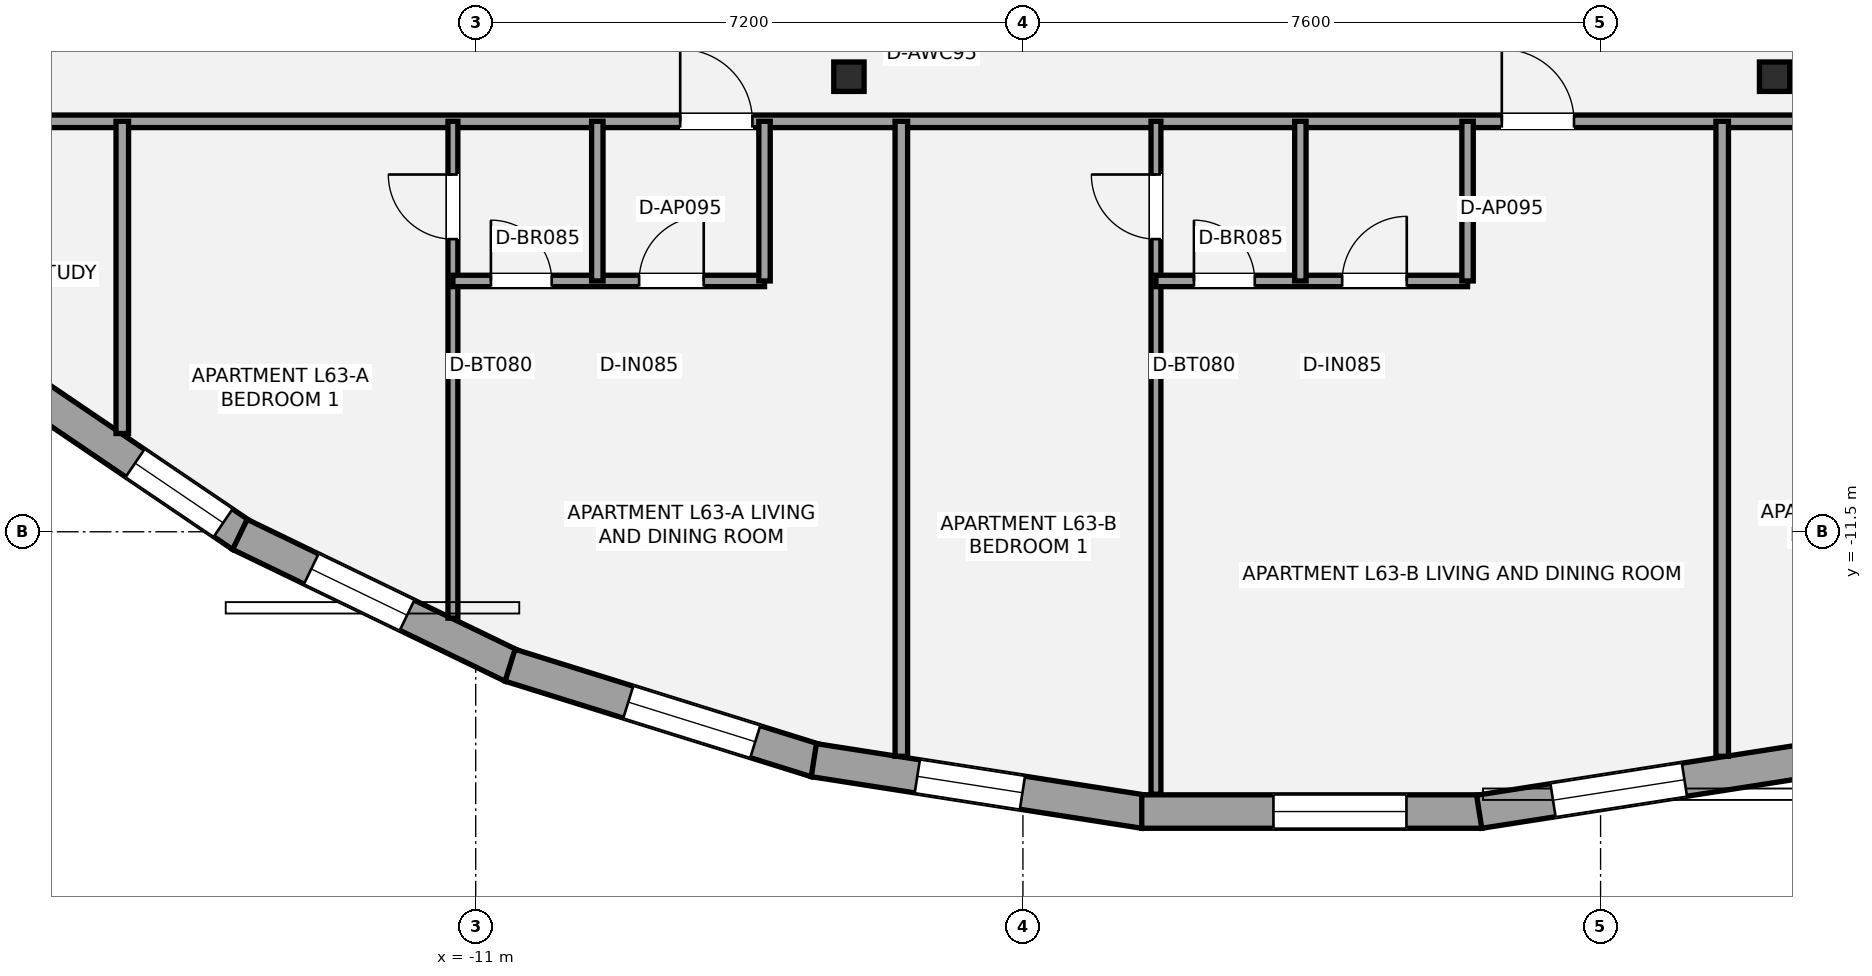
"""IFC4 building model, lengths in metres.
Left out: names, types, materials, properties, quantities, classifications, styles, units other than length and angle.
Written with IfcOpenShell. Run it as: python <this file> out.ifc"""

import sys

from ifc_helpers import new_model, si_unit, direction, frame, frame_2d, origin, origin_2d, place, context, subcontext, project, spatial, rectangle, i_section, extrude, element, fill, save


model = new_model("IFC4")
c1 = context("Model", 3, precision=1e-05, world=origin(), true_north=direction((0.0, 1.0)))
c2 = subcontext(c1, "Body", "Model", "MODEL_VIEW")
j1 = project(units=[si_unit("LENGTHUNIT", "METRE"), si_unit("PLANEANGLEUNIT", "RADIAN")], contexts=[c1])
p1 = place(None, origin())
s1 = spatial("IfcSite", under=j1, at=p1, CompositionType="ELEMENT")
p2 = place(p1, origin())
s2 = spatial("IfcBuilding", under=s1, at=p2, CompositionType="ELEMENT")
p3 = place(p2, frame((0.0, 0.0, 225.75)))
s3 = spatial("IfcBuildingStorey", under=s2, at=p3, CompositionType="ELEMENT", Elevation=225.75)
for number, where, z_axis, x_axis in (
    (1, (-6.09, -5.513, 0.0), (0.0, 0.0, 1.0), (1.0, 0.0, 0.0)),
    (2, (6.09, -5.513, 0.0), (0.0, 0.0, 1.0), (1.0, 0.0, 0.0)),
):
    element("IfcColumn", number, at=place(p3, frame(where, z_axis=z_axis, x_axis=x_axis)), inside=s3, PredefinedType="COLUMN", context=c2, shape_type="SweptSolid", body=[
        extrude(i_section(OverallWidth=0.399, OverallDepth=0.387, WebThickness=0.021, FlangeThickness=0.033, at=origin_2d()), origin(), (0.0, 0.0, 1.0), 3.15),
    ])
p4 = place(p3, frame((-14.075, -11.551, 0.0), z_axis=(0.0, 0.0, 1.0), x_axis=(-0.827635686249, 0.561265686504, 0.0)))
e3 = element("IfcWall", 3, at=p4, inside=s3, PredefinedType="STANDARD", context=c2, shape_type="SweptSolid", body=[
    extrude(rectangle(XDim=3.749, YDim=0.44, at=frame_2d((1.875, 0.0))), origin(), (0.0, 0.0, 1.0), 2.336),
])
p5 = place(p4, frame((0.3, 0.0, 0.58)))
e4 = element("IfcOpeningElement", 4, at=p5, cuts=e3, PredefinedType="OPENING", context=c2, shape_type="SweptSolid", body=[
    extrude(rectangle(XDim=1.4, YDim=1.55, at=frame_2d((0.7, 0.775))), frame((0.0, 0.23, 0.0), z_axis=(0.0, -1.0, 0.0), x_axis=(1.0, 0.0, 0.0)), (0.0, 0.0, 1.0), 0.46),
])
p6 = place(p3, frame((-10.518, -13.268, 0.0), z_axis=(0.0, 0.0, 1.0), x_axis=(-0.900331335269, 0.435205108808, 0.0)))
e5 = element("IfcWall", 5, at=p6, inside=s3, PredefinedType="STANDARD", context=c2, shape_type="SweptSolid", body=[
    extrude(rectangle(XDim=3.982, YDim=0.44, at=frame_2d((1.991, 0.0))), origin(), (0.0, 0.0, 1.0), 2.336),
])
p7 = place(p6, frame((1.539, 0.0, 0.55)))
e6 = element("IfcOpeningElement", 6, at=p7, cuts=e5, PredefinedType="OPENING", context=c2, shape_type="SweptSolid", body=[
    extrude(rectangle(XDim=1.4, YDim=1.55, at=frame_2d((0.7, 0.775))), frame((0.0, 0.23, 0.0), z_axis=(0.0, -1.0, 0.0), x_axis=(1.0, 0.0, 0.0)), (0.0, 0.0, 1.0), 0.46),
])
p8 = place(p3, frame((-6.52, -14.512, 0.0), z_axis=(0.0, 0.0, 1.0), x_axis=(-0.954643532685, 0.297751113352, 0.0)))
e7 = element("IfcWall", 7, at=p8, inside=s3, PredefinedType="STANDARD", context=c2, shape_type="SweptSolid", body=[
    extrude(rectangle(XDim=4.219, YDim=0.44, at=frame_2d((2.11, 0.0))), origin(), (0.0, 0.0, 1.0), 2.336),
])
p9 = place(p8, frame((0.841, 0.0, 0.55)))
e8 = element("IfcOpeningElement", 8, at=p9, cuts=e7, PredefinedType="OPENING", context=c2, shape_type="SweptSolid", body=[
    extrude(rectangle(XDim=1.75, YDim=1.55, at=frame_2d((0.875, 0.775))), frame((0.0, 0.23, 0.0), z_axis=(0.0, -1.0, 0.0), x_axis=(1.0, 0.0, 0.0)), (0.0, 0.0, 1.0), 0.46),
])
p10 = place(p3, frame((-2.203, -15.183, 0.0), z_axis=(0.0, 0.0, 1.0), x_axis=(-0.988037139715, 0.154216116355, 0.0)))
e9 = element("IfcWall", 9, at=p10, inside=s3, PredefinedType="STANDARD", context=c2, shape_type="SweptSolid", body=[
    extrude(rectangle(XDim=4.401, YDim=0.44, at=frame_2d((2.201, 0.0))), origin(), (0.0, 0.0, 1.0), 2.336),
])
p11 = place(p10, frame((1.623, 0.0, 0.45)))
e10 = element("IfcOpeningElement", 10, at=p11, cuts=e9, PredefinedType="OPENING", context=c2, shape_type="SweptSolid", body=[
    extrude(rectangle(XDim=1.4, YDim=1.55, at=frame_2d((0.7, 0.775))), frame((0.0, 0.23, 0.0), z_axis=(0.0, -1.0, 0.0), x_axis=(1.0, 0.0, 0.0)), (0.0, 0.0, 1.0), 0.46),
])
p12 = place(p3, frame((2.237, -15.181, 0.0), z_axis=(0.0, 0.0, 1.0), x_axis=(-1.0, 0.0, 0.0)))
e11 = element("IfcWall", 11, at=p12, inside=s3, PredefinedType="STANDARD", context=c2, shape_type="SweptSolid", body=[
    extrude(rectangle(XDim=4.474, YDim=0.44, at=frame_2d((2.237, 0.0))), origin(), (0.0, 0.0, 1.0), 2.336),
])
p13 = place(p12, frame((0.991, 0.0, 0.55)))
e12 = element("IfcOpeningElement", 12, at=p13, cuts=e11, PredefinedType="OPENING", context=c2, shape_type="SweptSolid", body=[
    extrude(rectangle(XDim=1.75, YDim=1.55, at=frame_2d((0.875, 0.775))), frame((0.0, 0.23, 0.0), z_axis=(0.0, -1.0, 0.0), x_axis=(1.0, 0.0, 0.0)), (0.0, 0.0, 1.0), 0.46),
])
p14 = place(p3, frame((6.551, -14.505, 0.0), z_axis=(0.0, 0.0, 1.0), x_axis=(-0.988037139715, -0.154216116355, 0.0)))
e13 = element("IfcWall", 13, at=p14, inside=s3, PredefinedType="STANDARD", context=c2, shape_type="SweptSolid", body=[
    extrude(rectangle(XDim=4.401, YDim=0.44, at=frame_2d((2.201, 0.0))), origin(), (0.0, 0.0, 1.0), 2.336),
])
p15 = place(p14, frame((1.668, 0.0, 0.55)))
e14 = element("IfcOpeningElement", 14, at=p15, cuts=e13, PredefinedType="OPENING", context=c2, shape_type="SweptSolid", body=[
    extrude(rectangle(XDim=1.75, YDim=1.55, at=frame_2d((0.875, 0.775))), frame((0.0, 0.23, 0.0), z_axis=(0.0, -1.0, 0.0), x_axis=(1.0, 0.0, 0.0)), (0.0, 0.0, 1.0), 0.46),
])
p16 = place(p3, frame((-20.059, -6.1, 0.0), z_axis=(0.0, 0.0, 1.0), x_axis=(1.0, 0.0, 0.0)))
e15 = element("IfcWall", 15, at=p16, inside=s3, PredefinedType="PARTITIONING", context=c2, shape_type="SweptSolid", body=[
    extrude(rectangle(XDim=40.118, YDim=0.165, at=frame_2d((20.059, 0.0))), origin(), (0.0, 0.0, 1.0), 2.423),
])
p17 = place(p16, frame((1.252, 0.0, 0.0)))
e16 = element("IfcOpeningElement", 16, at=p17, cuts=e15, PredefinedType="OPENING", context=c2, shape_type="SweptSolid", body=[
    extrude(rectangle(XDim=1.0, YDim=2.15, at=frame_2d((0.5, 1.075))), frame((0.0, 0.093, 0.0), z_axis=(0.0, -1.0, 0.0), x_axis=(1.0, 0.0, 0.0)), (0.0, 0.0, 1.0), 0.185),
])
p18 = place(p16, frame((37.817, 0.0, 0.0)))
e17 = element("IfcOpeningElement", 17, at=p18, cuts=e15, PredefinedType="OPENING", context=c2, shape_type="SweptSolid", body=[
    extrude(rectangle(XDim=1.0, YDim=2.15, at=frame_2d((0.5, 1.075))), frame((0.0, 0.093, 0.0), z_axis=(0.0, -1.0, 0.0), x_axis=(1.0, 0.0, 0.0)), (0.0, 0.0, 1.0), 0.185),
])
p19 = place(p16, frame((11.75, 0.0, 0.0)))
e18 = element("IfcOpeningElement", 18, at=p19, cuts=e15, PredefinedType="OPENING", context=c2, shape_type="SweptSolid", body=[
    extrude(rectangle(XDim=0.95, YDim=2.15, at=frame_2d((0.475, 1.075))), frame((0.0, 0.093, 0.0), z_axis=(0.0, -1.0, 0.0), x_axis=(1.0, 0.0, 0.0)), (0.0, 0.0, 1.0), 0.185),
])
p20 = place(p16, frame((22.56, 0.0, 0.0)))
e19 = element("IfcOpeningElement", 19, at=p20, cuts=e15, PredefinedType="OPENING", context=c2, shape_type="SweptSolid", body=[
    extrude(rectangle(XDim=0.95, YDim=2.15, at=frame_2d((0.475, 1.075))), frame((0.0, 0.093, 0.0), z_axis=(0.0, -1.0, 0.0), x_axis=(1.0, 0.0, 0.0)), (0.0, 0.0, 1.0), 0.185),
])
p21 = place(p16, frame((33.36, 0.0, 0.0)))
e20 = element("IfcOpeningElement", 20, at=p21, cuts=e15, PredefinedType="OPENING", context=c2, shape_type="SweptSolid", body=[
    extrude(rectangle(XDim=0.95, YDim=2.15, at=frame_2d((0.475, 1.075))), frame((0.0, 0.093, 0.0), z_axis=(0.0, -1.0, 0.0), x_axis=(1.0, 0.0, 0.0)), (0.0, 0.0, 1.0), 0.185),
])
p22 = place(p3, frame((-15.65, -10.207, 0.0), z_axis=(0.0, 0.0, 1.0), x_axis=(0.0, 1.0, 0.0)))
e21 = element("IfcWall", 21, at=p22, inside=s3, PredefinedType="PARTITIONING", context=c2, shape_type="SweptSolid", body=[
    extrude(rectangle(XDim=4.107, YDim=0.165, at=frame_2d((2.053, 0.0))), origin(), (0.0, 0.0, 1.0), 2.423),
])
for number, where, z_axis, x_axis in (
    (22, (-5.4, -14.454, 0.0), (0.0, 0.0, 1.0), (0.0, 1.0, 0.0)),
    (23, (5.4, -14.454, 0.0), (0.0, 0.0, 1.0), (0.0, 1.0, 0.0)),
):
    element("IfcWall", number, at=place(p3, frame(where, z_axis=z_axis, x_axis=x_axis)), inside=s3, PredefinedType="PARTITIONING", context=c2, shape_type="SweptSolid", body=[
        extrude(rectangle(XDim=8.354, YDim=0.165, at=frame_2d((4.177, 0.0))), origin(), (0.0, 0.0, 1.0), 2.423),
    ])
p23 = place(p3, frame((-11.3, -12.636, 0.0), z_axis=(0.0, 0.0, 1.0), x_axis=(0.0, 1.0, 0.0)))
e24 = element("IfcWall", 24, at=p23, inside=s3, PredefinedType="PARTITIONING", context=c2, shape_type="SweptSolid", body=[
    extrude(rectangle(XDim=6.536, YDim=0.13, at=frame_2d((3.268, 0.0))), origin(), (0.0, 0.0, 1.0), 2.423),
])
p24 = place(p23, frame((4.986, 0.0, 0.0)))
e25 = element("IfcOpeningElement", 25, at=p24, cuts=e24, PredefinedType="OPENING", context=c2, shape_type="SweptSolid", body=[
    extrude(rectangle(XDim=0.85, YDim=2.1, at=frame_2d((0.425, 1.05))), frame((0.0, 0.075, 0.0), z_axis=(0.0, -1.0, 0.0), x_axis=(1.0, 0.0, 0.0)), (0.0, 0.0, 1.0), 0.15),
])
p25 = place(p3, frame((-11.3, -8.2, 0.0), z_axis=(0.0, 0.0, 1.0), x_axis=(1.0, 0.0, 0.0)))
e26 = element("IfcWall", 26, at=p25, inside=s3, PredefinedType="PLUMBINGWALL", context=c2, shape_type="SweptSolid", body=[
    extrude(rectangle(XDim=4.1, YDim=0.15, at=frame_2d((2.05, 0.0))), origin(), (0.0, 0.0, 1.0), 2.423),
])
p26 = place(p25, frame((0.5, 0.0, 0.0)))
e27 = element("IfcOpeningElement", 27, at=p26, cuts=e26, PredefinedType="OPENING", context=c2, shape_type="SweptSolid", body=[
    extrude(rectangle(XDim=0.8, YDim=2.1, at=frame_2d((0.4, 1.05))), frame((0.0, 0.085, 0.0), z_axis=(0.0, -1.0, 0.0), x_axis=(1.0, 0.0, 0.0)), (0.0, 0.0, 1.0), 0.17),
])
p27 = place(p25, frame((2.45, 0.0, 0.0)))
e28 = element("IfcOpeningElement", 28, at=p27, cuts=e26, PredefinedType="OPENING", context=c2, shape_type="SweptSolid", body=[
    extrude(rectangle(XDim=0.85, YDim=2.1, at=frame_2d((0.425, 1.05))), frame((0.0, 0.085, 0.0), z_axis=(0.0, -1.0, 0.0), x_axis=(1.0, 0.0, 0.0)), (0.0, 0.0, 1.0), 0.17),
])
p28 = place(p3, frame((-9.4, -8.2, 0.0), z_axis=(0.0, 0.0, 1.0), x_axis=(0.0, 1.0, 0.0)))
e29 = element("IfcWall", 29, at=p28, inside=s3, PredefinedType="PLUMBINGWALL", context=c2, shape_type="SweptSolid", body=[
    extrude(rectangle(XDim=2.1, YDim=0.15, at=frame_2d((1.05, 0.0))), origin(), (0.0, 0.0, 1.0), 2.97),
])
p29 = place(p3, frame((-7.2, -8.2, 0.0), z_axis=(0.0, 0.0, 1.0), x_axis=(0.0, 1.0, 0.0)))
e30 = element("IfcWall", 30, at=p29, inside=s3, PredefinedType="PLUMBINGWALL", context=c2, shape_type="SweptSolid", body=[
    extrude(rectangle(XDim=2.1, YDim=0.15, at=frame_2d((1.05, 0.0))), origin(), (0.0, 0.0, 1.0), 2.423),
])
p30 = place(p3, frame((-2.05, -14.953, 0.0), z_axis=(0.0, 0.0, 1.0), x_axis=(0.0, 1.0, 0.0)))
e31 = element("IfcWall", 31, at=p30, inside=s3, PredefinedType="PARTITIONING", context=c2, shape_type="SweptSolid", body=[
    extrude(rectangle(XDim=8.853, YDim=0.13, at=frame_2d((4.426, 0.0))), origin(), (0.0, 0.0, 1.0), 2.423),
])
p31 = place(p30, frame((7.303, 0.0, 0.0)))
e32 = element("IfcOpeningElement", 32, at=p31, cuts=e31, PredefinedType="OPENING", context=c2, shape_type="SweptSolid", body=[
    extrude(rectangle(XDim=0.85, YDim=2.1, at=frame_2d((0.425, 1.05))), frame((0.0, 0.075, 0.0), z_axis=(0.0, -1.0, 0.0), x_axis=(1.0, 0.0, 0.0)), (0.0, 0.0, 1.0), 0.15),
])
p32 = place(p3, frame((-2.05, -8.2, 0.0), z_axis=(0.0, 0.0, 1.0), x_axis=(1.0, 0.0, 0.0)))
e33 = element("IfcWall", 33, at=p32, inside=s3, PredefinedType="PLUMBINGWALL", context=c2, shape_type="SweptSolid", body=[
    extrude(rectangle(XDim=4.1, YDim=0.15, at=frame_2d((2.05, 0.0))), origin(), (0.0, 0.0, 1.0), 2.423),
])
p33 = place(p32, frame((0.5, 0.0, 0.0)))
e34 = element("IfcOpeningElement", 34, at=p33, cuts=e33, PredefinedType="OPENING", context=c2, shape_type="SweptSolid", body=[
    extrude(rectangle(XDim=0.8, YDim=2.1, at=frame_2d((0.4, 1.05))), frame((0.0, 0.085, 0.0), z_axis=(0.0, -1.0, 0.0), x_axis=(1.0, 0.0, 0.0)), (0.0, 0.0, 1.0), 0.17),
])
p34 = place(p32, frame((2.45, 0.0, 0.0)))
e35 = element("IfcOpeningElement", 35, at=p34, cuts=e33, PredefinedType="OPENING", context=c2, shape_type="SweptSolid", body=[
    extrude(rectangle(XDim=0.85, YDim=2.1, at=frame_2d((0.425, 1.05))), frame((0.0, 0.085, 0.0), z_axis=(0.0, -1.0, 0.0), x_axis=(1.0, 0.0, 0.0)), (0.0, 0.0, 1.0), 0.17),
])
p35 = place(p3, frame((-0.15, -8.2, 0.0), z_axis=(0.0, 0.0, 1.0), x_axis=(0.0, 1.0, 0.0)))
e36 = element("IfcWall", 36, at=p35, inside=s3, PredefinedType="PLUMBINGWALL", context=c2, shape_type="SweptSolid", body=[
    extrude(rectangle(XDim=2.1, YDim=0.15, at=frame_2d((1.05, 0.0))), origin(), (0.0, 0.0, 1.0), 2.423),
])
p36 = place(p3, frame((2.05, -8.2, 0.0), z_axis=(0.0, 0.0, 1.0), x_axis=(0.0, 1.0, 0.0)))
e37 = element("IfcWall", 37, at=p36, inside=s3, PredefinedType="PLUMBINGWALL", context=c2, shape_type="SweptSolid", body=[
    extrude(rectangle(XDim=2.1, YDim=0.15, at=frame_2d((1.05, 0.0))), origin(), (0.0, 0.0, 1.0), 2.97),
])
p37 = place(p5, origin())
e38 = element("IfcWindow", 38, at=p37, inside=s3, PartitioningType="SINGLE_PANEL", PredefinedType="WINDOW", context=c2, shape_type="SweptSolid", body=[
    extrude(rectangle(XDim=1.4, YDim=1.55, at=frame_2d((0.7, 0.775))), frame((0.0, -0.01, 0.0), z_axis=(0.0, -1.0, 0.0), x_axis=(1.0, 0.0, 0.0)), (0.0, 0.0, 1.0), 0.06),
])
fill(e4, e38)
p38 = place(p7, origin())
e39 = element("IfcWindow", 39, at=p38, inside=s3, PartitioningType="SINGLE_PANEL", PredefinedType="WINDOW", context=c2, shape_type="SweptSolid", body=[
    extrude(rectangle(XDim=1.4, YDim=1.55, at=frame_2d((0.7, 0.775))), frame((0.0, -0.01, 0.0), z_axis=(0.0, -1.0, 0.0), x_axis=(1.0, 0.0, 0.0)), (0.0, 0.0, 1.0), 0.06),
])
fill(e6, e39)
p39 = place(p9, origin())
e40 = element("IfcWindow", 40, at=p39, inside=s3, PartitioningType="SINGLE_PANEL", PredefinedType="WINDOW", context=c2, shape_type="SweptSolid", body=[
    extrude(rectangle(XDim=1.75, YDim=1.55, at=frame_2d((0.875, 0.775))), frame((0.0, -0.01, 0.0), z_axis=(0.0, -1.0, 0.0), x_axis=(1.0, 0.0, 0.0)), (0.0, 0.0, 1.0), 0.06),
])
fill(e8, e40)
p40 = place(p11, origin())
e41 = element("IfcWindow", 41, at=p40, inside=s3, PartitioningType="SINGLE_PANEL", PredefinedType="WINDOW", context=c2, shape_type="SweptSolid", body=[
    extrude(rectangle(XDim=1.4, YDim=1.55, at=frame_2d((0.7, 0.775))), frame((0.0, -0.01, 0.0), z_axis=(0.0, -1.0, 0.0), x_axis=(1.0, 0.0, 0.0)), (0.0, 0.0, 1.0), 0.06),
])
fill(e10, e41)
p41 = place(p13, origin())
e42 = element("IfcWindow", 42, at=p41, inside=s3, PartitioningType="SINGLE_PANEL", PredefinedType="WINDOW", context=c2, shape_type="SweptSolid", body=[
    extrude(rectangle(XDim=1.75, YDim=1.55, at=frame_2d((0.875, 0.775))), frame((0.0, -0.01, 0.0), z_axis=(0.0, -1.0, 0.0), x_axis=(1.0, 0.0, 0.0)), (0.0, 0.0, 1.0), 0.06),
])
fill(e12, e42)
p42 = place(p15, origin())
e43 = element("IfcWindow", 43, at=p42, inside=s3, PartitioningType="SINGLE_PANEL", PredefinedType="WINDOW", context=c2, shape_type="SweptSolid", body=[
    extrude(rectangle(XDim=1.75, YDim=1.55, at=frame_2d((0.875, 0.775))), frame((0.0, -0.01, 0.0), z_axis=(0.0, -1.0, 0.0), x_axis=(1.0, 0.0, 0.0)), (0.0, 0.0, 1.0), 0.06),
])
fill(e14, e43)
p43 = place(p24, origin())
e44 = element("IfcDoor", 44, at=p43, inside=s3, OperationType="SINGLE_SWING_RIGHT", PredefinedType="DOOR", context=c2, shape_type="SweptSolid", body=[
    extrude(rectangle(XDim=0.85, YDim=2.1, at=frame_2d((0.425, 1.05))), frame((0.0, 0.025, 0.0), z_axis=(0.0, -1.0, 0.0), x_axis=(1.0, 0.0, 0.0)), (0.0, 0.0, 1.0), 0.05),
])
fill(e25, e44)
p44 = place(p26, origin())
e45 = element("IfcDoor", 45, at=p44, inside=s3, OperationType="SINGLE_SWING_LEFT", PredefinedType="DOOR", context=c2, shape_type="SweptSolid", body=[
    extrude(rectangle(XDim=0.8, YDim=2.1, at=frame_2d((0.4, 1.05))), frame((0.0, 0.025, 0.0), z_axis=(0.0, -1.0, 0.0), x_axis=(1.0, 0.0, 0.0)), (0.0, 0.0, 1.0), 0.05),
])
fill(e27, e45)
p45 = place(p27, origin())
e46 = element("IfcDoor", 46, at=p45, inside=s3, OperationType="SINGLE_SWING_RIGHT", PredefinedType="DOOR", context=c2, shape_type="SweptSolid", body=[
    extrude(rectangle(XDim=0.85, YDim=2.1, at=frame_2d((0.425, 1.05))), frame((0.0, 0.025, 0.0), z_axis=(0.0, -1.0, 0.0), x_axis=(1.0, 0.0, 0.0)), (0.0, 0.0, 1.0), 0.05),
])
fill(e28, e46)
p46 = place(p19, origin())
e47 = element("IfcDoor", 47, at=p46, inside=s3, OperationType="SINGLE_SWING_LEFT", PredefinedType="DOOR", context=c2, shape_type="SweptSolid", body=[
    extrude(rectangle(XDim=0.95, YDim=2.15, at=frame_2d((0.475, 1.075))), frame((0.0, 0.025, 0.0), z_axis=(0.0, -1.0, 0.0), x_axis=(1.0, 0.0, 0.0)), (0.0, 0.0, 1.0), 0.05),
])
fill(e18, e47)
p47 = place(p31, origin())
e48 = element("IfcDoor", 48, at=p47, inside=s3, OperationType="SINGLE_SWING_RIGHT", PredefinedType="DOOR", context=c2, shape_type="SweptSolid", body=[
    extrude(rectangle(XDim=0.85, YDim=2.1, at=frame_2d((0.425, 1.05))), frame((0.0, 0.025, 0.0), z_axis=(0.0, -1.0, 0.0), x_axis=(1.0, 0.0, 0.0)), (0.0, 0.0, 1.0), 0.05),
])
fill(e32, e48)
p48 = place(p33, origin())
e49 = element("IfcDoor", 49, at=p48, inside=s3, OperationType="SINGLE_SWING_LEFT", PredefinedType="DOOR", context=c2, shape_type="SweptSolid", body=[
    extrude(rectangle(XDim=0.8, YDim=2.1, at=frame_2d((0.4, 1.05))), frame((0.0, 0.025, 0.0), z_axis=(0.0, -1.0, 0.0), x_axis=(1.0, 0.0, 0.0)), (0.0, 0.0, 1.0), 0.05),
])
fill(e34, e49)
p49 = place(p34, origin())
e50 = element("IfcDoor", 50, at=p49, inside=s3, OperationType="SINGLE_SWING_RIGHT", PredefinedType="DOOR", context=c2, shape_type="SweptSolid", body=[
    extrude(rectangle(XDim=0.85, YDim=2.1, at=frame_2d((0.425, 1.05))), frame((0.0, 0.025, 0.0), z_axis=(0.0, -1.0, 0.0), x_axis=(1.0, 0.0, 0.0)), (0.0, 0.0, 1.0), 0.05),
])
fill(e35, e50)
p50 = place(p20, origin())
e51 = element("IfcDoor", 51, at=p50, inside=s3, OperationType="SINGLE_SWING_LEFT", PredefinedType="DOOR", context=c2, shape_type="SweptSolid", body=[
    extrude(rectangle(XDim=0.95, YDim=2.15, at=frame_2d((0.475, 1.075))), frame((0.0, 0.025, 0.0), z_axis=(0.0, -1.0, 0.0), x_axis=(1.0, 0.0, 0.0)), (0.0, 0.0, 1.0), 0.05),
])
fill(e19, e51)
save(model, sys.argv[1])
